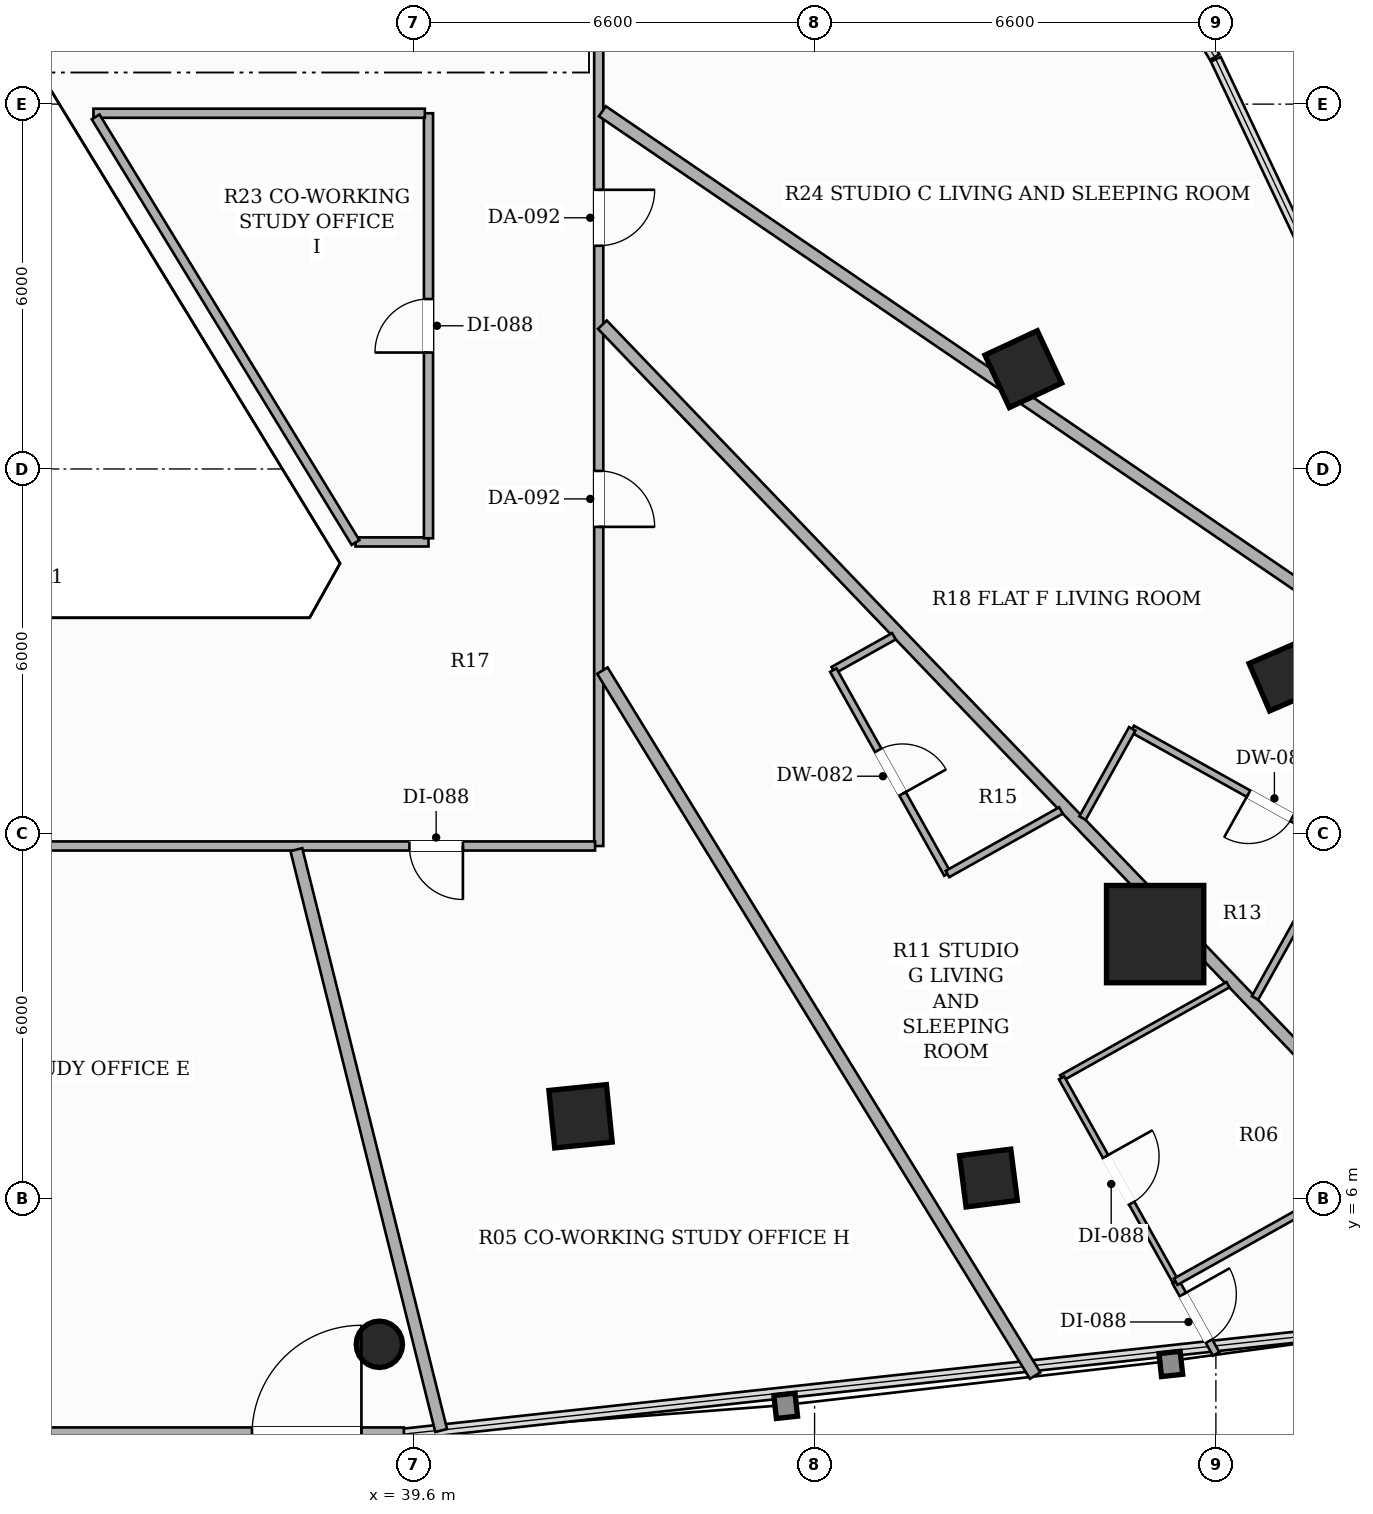
"""IFC4 building model, lengths in metres.
Left out: names, types, materials, properties, quantities, classifications, styles, units other than length and angle.
Written with IfcOpenShell. Run it as: python <this file> out.ifc"""

import sys

from ifc_helpers import new_model, si_unit, direction, frame, frame_2d, origin, origin_2d, place, context, subcontext, project, spatial, rectangle, hollow_rectangle, hollow_circle, extrude, element, fill, save


model = new_model("IFC4")
c1 = context("Model", 3, precision=1e-05, world=origin(), true_north=direction((0.0, 1.0)))
c2 = subcontext(c1, "Body", "Model", "MODEL_VIEW")
j1 = project(units=[si_unit("LENGTHUNIT", "METRE"), si_unit("PLANEANGLEUNIT", "RADIAN")], contexts=[c1])
p1 = place(None, origin())
s1 = spatial("IfcSite", under=j1, at=p1, CompositionType="ELEMENT")
p2 = place(p1, origin())
s2 = spatial("IfcBuilding", under=s1, at=p2, CompositionType="ELEMENT")
p3 = place(p2, frame((0.0, 0.0, 77.45)))
s3 = spatial("IfcBuildingStorey", under=s2, at=p3, CompositionType="ELEMENT", Elevation=77.45)
p4 = place(p3, frame((51.801, 10.351, 0.0), z_axis=(0.0, 0.0, 1.0), x_axis=(1.0, 0.0, 0.0)))
e1 = element("IfcColumn", 1, at=p4, inside=s3, PredefinedType="COLUMN", context=c2, shape_type="SweptSolid", body=[
    extrude(hollow_rectangle(XDim=1.6, YDim=1.6, WallThickness=0.05, at=origin_2d()), origin(), (0.0, 0.0, 1.0), 3.3),
])
for number, where, z_axis, x_axis in (
    (2, (42.351, 7.355, 0.0), (0.0, 0.0, 1.0), (0.995, 0.101, 0.0)),
    (3, (49.633, 19.642, 0.0), (0.0, 0.0, 1.0), (-0.423, 0.906, 0.0)),
):
    element("IfcColumn", number, at=place(p3, frame(where, z_axis=z_axis, x_axis=x_axis)), inside=s3, PredefinedType="COLUMN", context=c2, shape_type="SweptSolid", body=[
        extrude(hollow_rectangle(XDim=0.95, YDim=0.95, WallThickness=0.032, at=origin_2d()), origin(), (0.0, 0.0, 1.0), 3.3),
    ])
for number, where, z_axis, x_axis in (
    (4, (49.059, 6.339, 0.0), (0.0, 0.0, 1.0), (0.992, 0.127, 0.0)),
    (5, (53.905, 14.58, 0.0), (0.0, 0.0, 1.0), (-0.397, 0.918, 0.0)),
):
    element("IfcColumn", number, at=place(p3, frame(where, z_axis=z_axis, x_axis=x_axis)), inside=s3, PredefinedType="COLUMN", context=c2, shape_type="SweptSolid", body=[
        extrude(hollow_rectangle(XDim=0.85, YDim=0.85, WallThickness=0.028, at=origin_2d()), origin(), (0.0, 0.0, 1.0), 3.3),
    ])
p5 = place(p3, frame((39.042, 3.605, 0.0), z_axis=(0.0, 0.0, 1.0), x_axis=(1.0, 0.0, 0.0)))
e6 = element("IfcColumn", 6, at=p5, inside=s3, PredefinedType="COLUMN", context=c2, shape_type="SweptSolid", body=[
    extrude(hollow_circle(Radius=0.381, WallThickness=0.022, at=origin_2d()), origin(), (0.0, 0.0, 1.0), 3.3),
])
p6 = place(p3, frame((26.554, 2.118, 0.0), z_axis=(0.0, 0.0, 1.0), x_axis=(1.0, 0.0, 0.0)))
e7 = element("IfcWall", 7, at=p6, inside=s3, PredefinedType="SOLIDWALL", context=c2, shape_type="SweptSolid", body=[
    extrude(rectangle(XDim=12.891, YDim=0.24, at=frame_2d((6.446, 0.0))), origin(), (0.0, 0.0, 1.0), 2.624),
])
p7 = place(p6, frame((10.393, 0.0, 0.0)))
e8 = element("IfcOpeningElement", 8, at=p7, cuts=e7, PredefinedType="OPENING", context=c2, shape_type="SweptSolid", body=[
    extrude(rectangle(XDim=1.8, YDim=2.2, at=frame_2d((0.9, 1.1))), frame((0.0, 0.13, 0.0), z_axis=(0.0, -1.0, 0.0), x_axis=(1.0, 0.0, 0.0)), (0.0, 0.0, 1.0), 0.26),
])
p8 = place(p3, frame((42.65, 36.84, 0.0), z_axis=(0.0, 0.0, 1.0), x_axis=(0.0, -1.0, 0.0)))
e9 = element("IfcWall", 9, at=p8, inside=s3, PredefinedType="PARTITIONING", context=c2, shape_type="SweptSolid", body=[
    extrude(rectangle(XDim=25.04, YDim=0.15, at=frame_2d((12.52, 0.0))), origin(), (0.0, 0.0, 1.0), 2.413),
])
p9 = place(p8, frame((6.171, 0.0, 0.0)))
e10 = element("IfcOpeningElement", 10, at=p9, cuts=e9, PredefinedType="OPENING", context=c2, shape_type="SweptSolid", body=[
    extrude(rectangle(XDim=0.92, YDim=2.15, at=frame_2d((0.46, 1.075))), frame((0.0, 0.085, 0.0), z_axis=(0.0, -1.0, 0.0), x_axis=(1.0, 0.0, 0.0)), (0.0, 0.0, 1.0), 0.17),
])
p10 = place(p8, frame((14.249, 0.0, 0.0)))
e11 = element("IfcOpeningElement", 11, at=p10, cuts=e9, PredefinedType="OPENING", context=c2, shape_type="SweptSolid", body=[
    extrude(rectangle(XDim=0.92, YDim=2.15, at=frame_2d((0.46, 1.075))), frame((0.0, 0.085, 0.0), z_axis=(0.0, -1.0, 0.0), x_axis=(1.0, 0.0, 0.0)), (0.0, 0.0, 1.0), 0.17),
])
p11 = place(p8, frame((18.872, 0.0, 0.0)))
e12 = element("IfcOpeningElement", 12, at=p11, cuts=e9, PredefinedType="OPENING", context=c2, shape_type="SweptSolid", body=[
    extrude(rectangle(XDim=0.92, YDim=2.15, at=frame_2d((0.46, 1.075))), frame((0.0, 0.085, 0.0), z_axis=(0.0, -1.0, 0.0), x_axis=(1.0, 0.0, 0.0)), (0.0, 0.0, 1.0), 0.17),
])
p12 = place(p3, frame((42.59, 11.8, 0.0), z_axis=(0.0, 0.0, 1.0), x_axis=(-1.0, 0.0, 0.0)))
e13 = element("IfcWall", 13, at=p12, inside=s3, PredefinedType="PARTITIONING", context=c2, shape_type="SweptSolid", body=[
    extrude(rectangle(XDim=19.24, YDim=0.15, at=frame_2d((9.62, 0.0))), origin(), (0.0, 0.0, 1.0), 2.669),
])
p13 = place(p12, frame((9.24, 0.0, 0.0)))
e14 = element("IfcOpeningElement", 14, at=p13, cuts=e13, PredefinedType="OPENING", context=c2, shape_type="SweptSolid", body=[
    extrude(rectangle(XDim=0.88, YDim=2.1, at=frame_2d((0.44, 1.05))), frame((0.0, 0.085, 0.0), z_axis=(0.0, -1.0, 0.0), x_axis=(1.0, 0.0, 0.0)), (0.0, 0.0, 1.0), 0.17),
])
p14 = place(p12, frame((2.174, 0.0, 0.0)))
e15 = element("IfcOpeningElement", 15, at=p14, cuts=e13, PredefinedType="OPENING", context=c2, shape_type="SweptSolid", body=[
    extrude(rectangle(XDim=0.88, YDim=2.1, at=frame_2d((0.44, 1.05))), frame((0.0, 0.085, 0.0), z_axis=(0.0, -1.0, 0.0), x_axis=(1.0, 0.0, 0.0)), (0.0, 0.0, 1.0), 0.17),
])
p15 = place(p3, frame((38.65, 16.8, 0.0), z_axis=(0.0, 0.0, 1.0), x_axis=(1.0, 0.0, 0.0)))
e16 = element("IfcWall", 16, at=p15, inside=s3, PredefinedType="PARTITIONING", context=c2, shape_type="SweptSolid", body=[
    extrude(rectangle(XDim=1.2, YDim=0.15, at=frame_2d((0.6, 0.0))), origin(), (0.0, 0.0, 1.0), 3.06),
])
p16 = place(p3, frame((39.85, 16.86, 0.0), z_axis=(0.0, 0.0, 1.0), x_axis=(0.0, 1.0, 0.0)))
e17 = element("IfcWall", 17, at=p16, inside=s3, PredefinedType="PARTITIONING", context=c2, shape_type="SweptSolid", body=[
    extrude(rectangle(XDim=6.99, YDim=0.15, at=frame_2d((3.495, 0.0))), origin(), (0.0, 0.0, 1.0), 2.669),
])
p17 = place(p16, frame((3.055, 0.0, 0.0)))
e18 = element("IfcOpeningElement", 18, at=p17, cuts=e17, PredefinedType="OPENING", context=c2, shape_type="SweptSolid", body=[
    extrude(rectangle(XDim=0.88, YDim=2.1, at=frame_2d((0.44, 1.05))), frame((0.0, 0.085, 0.0), z_axis=(0.0, -1.0, 0.0), x_axis=(1.0, 0.0, 0.0)), (0.0, 0.0, 1.0), 0.17),
])
p18 = place(p3, frame((39.79, 23.85, 0.0), z_axis=(0.0, 0.0, 1.0), x_axis=(-1.0, 0.0, 0.0)))
e19 = element("IfcWall", 19, at=p18, inside=s3, PredefinedType="PARTITIONING", context=c2, shape_type="SweptSolid", body=[
    extrude(rectangle(XDim=5.45, YDim=0.15, at=frame_2d((2.725, 0.0))), origin(), (0.0, 0.0, 1.0), 2.669),
])
p19 = place(p3, frame((34.376, 23.79, 0.0), z_axis=(0.0, 0.0, 1.0), x_axis=(0.521108010454, -0.853490738931, 0.0)))
e20 = element("IfcWall", 20, at=p19, inside=s3, PredefinedType="PARTITIONING", context=c2, shape_type="SweptSolid", body=[
    extrude(rectangle(XDim=8.202, YDim=0.15, at=frame_2d((4.101, 0.0))), origin(), (0.0, 0.0, 1.0), 2.669),
])
p20 = place(p3, frame((58.165, 13.35, 0.0), z_axis=(0.0, 0.0, 1.0), x_axis=(-0.826341659386, 0.563169123766, 0.0)))
e21 = element("IfcWall", 21, at=p20, inside=s3, PredefinedType="PARTITIONING", context=c2, shape_type="SweptSolid", body=[
    extrude(rectangle(XDim=18.703, YDim=0.2, at=frame_2d((9.352, 0.0))), origin(), (0.0, 0.0, 1.0), 2.413),
])
p21 = place(p3, frame((37.677, 11.74, 0.0), z_axis=(0.0, 0.0, 1.0), x_axis=(0.241946282122, -0.970289645707, 0.0)))
e22 = element("IfcWall", 22, at=p21, inside=s3, PredefinedType="PARTITIONING", context=c2, shape_type="SweptSolid", body=[
    extrude(rectangle(XDim=9.845, YDim=0.2, at=frame_2d((4.923, 0.0))), origin(), (0.0, 0.0, 1.0), 2.413),
])
p22 = place(p3, frame((58.237, 4.179, 0.0), z_axis=(0.0, 0.0, 1.0), x_axis=(-0.69208567792, 0.721815360337, 0.0)))
e23 = element("IfcWall", 23, at=p22, inside=s3, PredefinedType="PARTITIONING", context=c2, shape_type="SweptSolid", body=[
    extrude(rectangle(XDim=22.435, YDim=0.2, at=frame_2d((11.218, 0.0))), origin(), (0.0, 0.0, 1.0), 2.413),
])
p23 = place(p3, frame((49.827, 3.09, 0.0), z_axis=(0.0, 0.0, 1.0), x_axis=(-0.523146880199, 0.852242536921, 0.0)))
e24 = element("IfcWall", 24, at=p23, inside=s3, PredefinedType="PARTITIONING", context=c2, shape_type="SweptSolid", body=[
    extrude(rectangle(XDim=13.604, YDim=0.2, at=frame_2d((6.802, 0.0))), origin(), (0.0, 0.0, 1.0), 2.413),
])
p24 = place(p3, frame((54.847, 11.818, 0.0), z_axis=(0.0, 0.0, 1.0), x_axis=(-0.87346578699, 0.486885529624, 0.0)))
e25 = element("IfcWall", 25, at=p24, inside=s3, PredefinedType="PARTITIONING", context=c2, shape_type="SweptSolid", body=[
    extrude(rectangle(XDim=3.919, YDim=0.12, at=frame_2d((1.959, 0.0))), origin(), (0.0, 0.0, 1.0), 2.413),
])
p25 = place(p24, frame((0.91, 0.0, 0.0)))
e26 = element("IfcOpeningElement", 26, at=p25, cuts=e25, PredefinedType="OPENING", context=c2, shape_type="SweptSolid", body=[
    extrude(rectangle(XDim=0.82, YDim=2.1, at=frame_2d((0.41, 1.05))), frame((0.0, 0.07, 0.0), z_axis=(0.0, -1.0, 0.0), x_axis=(1.0, 0.0, 0.0)), (0.0, 0.0, 1.0), 0.14),
])
p26 = place(p3, frame((51.424, 13.726, 0.0), z_axis=(0.0, 0.0, 1.0), x_axis=(-0.486605473044, -0.873621836726, 0.0)))
e27 = element("IfcWall", 27, at=p26, inside=s3, PredefinedType="PARTITIONING", context=c2, shape_type="SweptSolid", body=[
    extrude(rectangle(XDim=1.679, YDim=0.12, at=frame_2d((0.84, 0.0))), origin(), (0.0, 0.0, 1.0), 2.413),
])
p27 = place(p3, frame((54.847, 11.818, 0.0), z_axis=(0.0, 0.0, 1.0), x_axis=(-0.486822226103, -0.873501070504, 0.0)))
e28 = element("IfcWall", 28, at=p27, inside=s3, PredefinedType="PARTITIONING", context=c2, shape_type="SweptSolid", body=[
    extrude(rectangle(XDim=2.882, YDim=0.12, at=frame_2d((1.441, 0.0))), origin(), (0.0, 0.0, 1.0), 3.06),
])
p28 = place(p3, frame((47.505, 15.249, 0.0), z_axis=(0.0, 0.0, 1.0), x_axis=(-0.872914025969, -0.487874064967, 0.0)))
e29 = element("IfcWall", 29, at=p28, inside=s3, PredefinedType="PARTITIONING", context=c2, shape_type="SweptSolid", body=[
    extrude(rectangle(XDim=1.142, YDim=0.12, at=frame_2d((0.571, 0.0))), origin(), (0.0, 0.0, 1.0), 3.06),
])
p29 = place(p3, frame((46.508, 14.692, 0.0), z_axis=(0.0, 0.0, 1.0), x_axis=(0.488483407483, -0.872573183529, 0.0)))
e30 = element("IfcWall", 30, at=p29, inside=s3, PredefinedType="PARTITIONING", context=c2, shape_type="SweptSolid", body=[
    extrude(rectangle(XDim=3.843, YDim=0.12, at=frame_2d((1.921, 0.0))), origin(), (0.0, 0.0, 1.0), 3.06),
])
p30 = place(p29, frame((1.511, 0.0, 0.0)))
e31 = element("IfcOpeningElement", 31, at=p30, cuts=e30, PredefinedType="OPENING", context=c2, shape_type="SweptSolid", body=[
    extrude(rectangle(XDim=0.82, YDim=2.1, at=frame_2d((0.41, 1.05))), frame((0.0, 0.07, 0.0), z_axis=(0.0, -1.0, 0.0), x_axis=(1.0, 0.0, 0.0)), (0.0, 0.0, 1.0), 0.14),
])
p31 = place(p3, frame((48.385, 11.339, 0.0), z_axis=(0.0, 0.0, 1.0), x_axis=(0.872618854318, 0.488401817246, 0.0)))
e32 = element("IfcWall", 32, at=p31, inside=s3, PredefinedType="PARTITIONING", context=c2, shape_type="SweptSolid", body=[
    extrude(rectangle(XDim=2.139, YDim=0.12, at=frame_2d((1.07, 0.0))), origin(), (0.0, 0.0, 1.0), 2.413),
])
p32 = place(p3, frame((52.139, 4.634, 0.0), z_axis=(0.0, 0.0, 1.0), x_axis=(0.488778203453, -0.872408085605, 0.0)))
e33 = element("IfcWall", 33, at=p32, inside=s3, PredefinedType="PARTITIONING", context=c2, shape_type="SweptSolid", body=[
    extrude(rectangle(XDim=1.361, YDim=0.12, at=frame_2d((0.68, 0.0))), origin(), (0.0, 0.0, 1.0), 2.619),
])
p33 = place(p32, frame((0.24, 0.0, 0.0)))
e34 = element("IfcOpeningElement", 34, at=p33, cuts=e33, PredefinedType="OPENING", context=c2, shape_type="SweptSolid", body=[
    extrude(rectangle(XDim=0.88, YDim=2.1, at=frame_2d((0.44, 1.05))), frame((0.0, 0.07, 0.0), z_axis=(0.0, -1.0, 0.0), x_axis=(1.0, 0.0, 0.0)), (0.0, 0.0, 1.0), 0.14),
])
p34 = place(p3, frame((52.999, 9.519, 0.0), z_axis=(0.0, 0.0, 1.0), x_axis=(-0.87247814598, -0.488653133406, 0.0)))
e35 = element("IfcWall", 35, at=p34, inside=s3, PredefinedType="PARTITIONING", context=c2, shape_type="SweptSolid", body=[
    extrude(rectangle(XDim=3.137, YDim=0.1, at=frame_2d((1.569, 0.0))), origin(), (0.0, 0.0, 1.0), 2.413),
])
p35 = place(p3, frame((50.262, 7.986, 0.0), z_axis=(0.0, 0.0, 1.0), x_axis=(0.488564666262, -0.872527688317, 0.0)))
e36 = element("IfcWall", 36, at=p35, inside=s3, PredefinedType="PARTITIONING", context=c2, shape_type="SweptSolid", body=[
    extrude(rectangle(XDim=3.842, YDim=0.1, at=frame_2d((1.921, 0.0))), origin(), (0.0, 0.0, 1.0), 2.413),
])
p36 = place(p35, frame((1.481, 0.0, 0.0)))
e37 = element("IfcOpeningElement", 37, at=p36, cuts=e36, PredefinedType="OPENING", context=c2, shape_type="SweptSolid", body=[
    extrude(rectangle(XDim=0.88, YDim=2.1, at=frame_2d((0.44, 1.05))), frame((0.0, 0.06, 0.0), z_axis=(0.0, -1.0, 0.0), x_axis=(1.0, 0.0, 0.0)), (0.0, 0.0, 1.0), 0.12),
])
p37 = place(p3, frame((52.139, 4.634, 0.0), z_axis=(0.0, 0.0, 1.0), x_axis=(0.87266304729, 0.488322850064, 0.0)))
e38 = element("IfcWall", 38, at=p37, inside=s3, PredefinedType="PARTITIONING", context=c2, shape_type="SweptSolid", body=[
    extrude(rectangle(XDim=4.135, YDim=0.12, at=frame_2d((2.067, 0.0))), origin(), (0.0, 0.0, 1.0), 2.619),
])
p38 = place(p7, origin())
e39 = element("IfcDoor", 39, at=p38, inside=s3, OperationType="SINGLE_SWING_RIGHT", PredefinedType="DOOR", context=c2, shape_type="SweptSolid", body=[
    extrude(rectangle(XDim=1.8, YDim=2.2, at=frame_2d((0.9, 1.1))), frame((0.0, 0.025, 0.0), z_axis=(0.0, -1.0, 0.0), x_axis=(1.0, 0.0, 0.0)), (0.0, 0.0, 1.0), 0.05),
])
fill(e8, e39)
p39 = place(p10, origin())
e40 = element("IfcDoor", 40, at=p39, inside=s3, OperationType="SINGLE_SWING_LEFT", PredefinedType="DOOR", context=c2, shape_type="SweptSolid", body=[
    extrude(rectangle(XDim=0.92, YDim=2.15, at=frame_2d((0.46, 1.075))), frame((0.0, 0.025, 0.0), z_axis=(0.0, -1.0, 0.0), x_axis=(1.0, 0.0, 0.0)), (0.0, 0.0, 1.0), 0.05),
])
fill(e11, e40)
p40 = place(p25, origin())
e41 = element("IfcDoor", 41, at=p40, inside=s3, OperationType="SINGLE_SWING_RIGHT", PredefinedType="DOOR", context=c2, shape_type="SweptSolid", body=[
    extrude(rectangle(XDim=0.82, YDim=2.1, at=frame_2d((0.41, 1.05))), frame((0.0, 0.025, 0.0), z_axis=(0.0, -1.0, 0.0), x_axis=(1.0, 0.0, 0.0)), (0.0, 0.0, 1.0), 0.05),
])
fill(e26, e41)
p41 = place(p11, origin())
e42 = element("IfcDoor", 42, at=p41, inside=s3, OperationType="SINGLE_SWING_RIGHT", PredefinedType="DOOR", context=c2, shape_type="SweptSolid", body=[
    extrude(rectangle(XDim=0.92, YDim=2.15, at=frame_2d((0.46, 1.075))), frame((0.0, 0.025, 0.0), z_axis=(0.0, -1.0, 0.0), x_axis=(1.0, 0.0, 0.0)), (0.0, 0.0, 1.0), 0.05),
])
fill(e12, e42)
p42 = place(p30, origin())
e43 = element("IfcDoor", 43, at=p42, inside=s3, OperationType="SINGLE_SWING_RIGHT", PredefinedType="DOOR", context=c2, shape_type="SweptSolid", body=[
    extrude(rectangle(XDim=0.82, YDim=2.1, at=frame_2d((0.41, 1.05))), frame((0.0, 0.025, 0.0), z_axis=(0.0, -1.0, 0.0), x_axis=(1.0, 0.0, 0.0)), (0.0, 0.0, 1.0), 0.05),
])
fill(e31, e43)
p43 = place(p33, origin())
e44 = element("IfcDoor", 44, at=p43, inside=s3, OperationType="SINGLE_SWING_LEFT", PredefinedType="DOOR", context=c2, shape_type="SweptSolid", body=[
    extrude(rectangle(XDim=0.88, YDim=2.1, at=frame_2d((0.44, 1.05))), frame((0.0, 0.025, 0.0), z_axis=(0.0, -1.0, 0.0), x_axis=(1.0, 0.0, 0.0)), (0.0, 0.0, 1.0), 0.05),
])
fill(e34, e44)
p44 = place(p36, origin())
e45 = element("IfcDoor", 45, at=p44, inside=s3, OperationType="SINGLE_SWING_LEFT", PredefinedType="DOOR", context=c2, shape_type="SweptSolid", body=[
    extrude(rectangle(XDim=0.88, YDim=2.1, at=frame_2d((0.44, 1.05))), frame((0.0, 0.025, 0.0), z_axis=(0.0, -1.0, 0.0), x_axis=(1.0, 0.0, 0.0)), (0.0, 0.0, 1.0), 0.05),
])
fill(e37, e45)
p45 = place(p14, origin())
e46 = element("IfcDoor", 46, at=p45, inside=s3, OperationType="SINGLE_SWING_LEFT", PredefinedType="DOOR", context=c2, shape_type="SweptSolid", body=[
    extrude(rectangle(XDim=0.88, YDim=2.1, at=frame_2d((0.44, 1.05))), frame((0.0, 0.025, 0.0), z_axis=(0.0, -1.0, 0.0), x_axis=(1.0, 0.0, 0.0)), (0.0, 0.0, 1.0), 0.05),
])
fill(e15, e46)
p46 = place(p17, origin())
e47 = element("IfcDoor", 47, at=p46, inside=s3, OperationType="SINGLE_SWING_LEFT", PredefinedType="DOOR", context=c2, shape_type="SweptSolid", body=[
    extrude(rectangle(XDim=0.88, YDim=2.1, at=frame_2d((0.44, 1.05))), frame((0.0, 0.025, 0.0), z_axis=(0.0, -1.0, 0.0), x_axis=(1.0, 0.0, 0.0)), (0.0, 0.0, 1.0), 0.05),
])
fill(e18, e47)
save(model, sys.argv[1])
